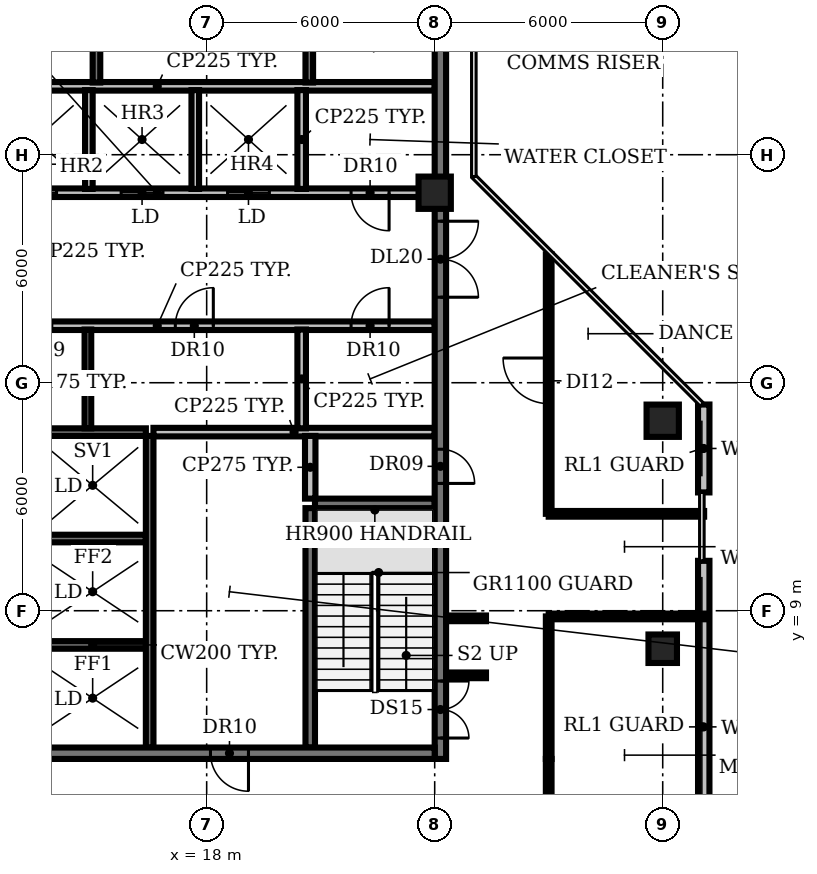
"""IFC4 building model, lengths in metres.
Left out: names, types, materials, properties, quantities, classifications, styles, units other than length and angle.
Written with IfcOpenShell. Run it as: python <this file> out.ifc"""

import sys

from ifc_helpers import new_model, si_unit, direction, frame, frame_2d, origin, origin_2d, place, context, subcontext, project, spatial, rectangle, circle, extrude, element, fill, save


model = new_model("IFC4")
c1 = context("Model", 3, precision=1e-05, world=origin(), true_north=direction((0.0, 1.0)))
c2 = subcontext(c1, "Body", "Model", "MODEL_VIEW")
j1 = project(units=[si_unit("LENGTHUNIT", "METRE"), si_unit("PLANEANGLEUNIT", "RADIAN")], contexts=[c1])
p1 = place(None, origin())
s1 = spatial("IfcSite", under=j1, at=p1, CompositionType="ELEMENT")
p2 = place(p1, origin())
s2 = spatial("IfcBuilding", under=s1, at=p2, CompositionType="ELEMENT")
p3 = place(p2, frame((0.0, 0.0, 272.6)))
s3 = spatial("IfcBuildingStorey", under=s2, at=p3, CompositionType="ELEMENT", Elevation=272.6)
p4 = place(p3, frame((24.0, 20.0, 0.0), z_axis=(0.0, 0.0, 1.0), x_axis=(1.0, 0.0, 0.0)))
e1 = element("IfcColumn", 1, at=p4, inside=s3, PredefinedType="COLUMN", context=c2, shape_type="SweptSolid", body=[
    extrude(circle(Radius=0.425, at=origin_2d()), origin(), (0.0, 0.0, 1.0), 3.85),
])
p5 = place(p3, frame((30.0, 8.0, 0.0), z_axis=(0.0, 0.0, 1.0), x_axis=(1.0, 0.0, 0.0)))
e2 = element("IfcColumn", 2, at=p5, inside=s3, PredefinedType="COLUMN", context=c2, shape_type="SweptSolid", body=[
    extrude(rectangle(XDim=0.75, YDim=0.75, at=origin_2d()), origin(), (0.0, 0.0, 1.0), 3.85),
])
p6 = place(p3, frame((30.0, 14.0, 0.0), z_axis=(0.0, 0.0, 1.0), x_axis=(1.0, 0.0, 0.0)))
e3 = element("IfcColumn", 3, at=p6, inside=s3, PredefinedType="COLUMN", context=c2, shape_type="SweptSolid", body=[
    extrude(circle(Radius=0.425, at=origin_2d()), origin(), (0.0, 0.0, 1.0), 3.85),
])
p7 = place(p3, frame((31.08, 1.573, 0.0), z_axis=(0.0, 0.0, 1.0), x_axis=(0.0, 1.0, 0.0)))
e4 = element("IfcWall", 4, at=p7, inside=s3, PredefinedType="SOLIDWALL", context=c2, shape_type="SweptSolid", body=[
    extrude(rectangle(XDim=8.74, YDim=0.3, at=frame_2d((4.37, 0.0))), origin(), (0.0, 0.0, 1.0), 3.85),
])
p8 = place(p3, frame((31.08, 12.113, 0.0), z_axis=(0.0, 0.0, 1.0), x_axis=(0.0, 1.0, 0.0)))
e5 = element("IfcWall", 5, at=p8, inside=s3, PredefinedType="SOLIDWALL", context=c2, shape_type="SweptSolid", body=[
    extrude(rectangle(XDim=2.313, YDim=0.3, at=frame_2d((1.157, 0.0))), origin(), (0.0, 0.0, 1.0), 3.85),
])
for number, where, z_axis, x_axis in (
    (6, (13.6, 8.1, 0.0), (0.0, 0.0, 1.0), (1.0, 0.0, 0.0)),
    (7, (13.6, 10.9, 0.0), (0.0, 0.0, 1.0), (1.0, 0.0, 0.0)),
):
    element("IfcWall", number, at=place(p3, frame(where, z_axis=z_axis, x_axis=x_axis)), inside=s3, PredefinedType="SHEAR", context=c2, shape_type="SweptSolid", body=[
        extrude(rectangle(XDim=2.8, YDim=0.2, at=frame_2d((1.4, 0.0))), origin(), (0.0, 0.0, 1.0), 3.85),
    ])
p9 = place(p3, frame((20.85, 11.825, 0.0), z_axis=(0.0, 0.0, 1.0), x_axis=(1.0, 0.0, 0.0)))
e8 = element("IfcWall", 8, at=p9, inside=s3, PredefinedType="SHEAR", context=c2, shape_type="SweptSolid", body=[
    extrude(rectangle(XDim=3.15, YDim=0.25, at=frame_2d((1.575, 0.0))), origin(), (0.0, 0.0, 1.0), 3.85),
])
p10 = place(p3, frame((13.6, 13.7, 0.0), z_axis=(0.0, 0.0, 1.0), x_axis=(1.0, 0.0, 0.0)))
e9 = element("IfcWall", 9, at=p10, inside=s3, PredefinedType="SHEAR", context=c2, shape_type="SweptSolid", body=[
    extrude(rectangle(XDim=2.8, YDim=0.2, at=frame_2d((1.4, 0.0))), origin(), (0.0, 0.0, 1.0), 3.85),
])
p11 = place(p3, frame((16.6, 13.7, 0.0), z_axis=(0.0, 0.0, 1.0), x_axis=(1.0, 0.0, 0.0)))
e10 = element("IfcWall", 10, at=p11, inside=s3, PredefinedType="PARTITIONING", context=c2, shape_type="SweptSolid", body=[
    extrude(rectangle(XDim=7.4, YDim=0.225, at=frame_2d((3.7, 0.0))), origin(), (0.0, 0.0, 1.0), 3.85),
])
p12 = place(p3, frame((9.4, 16.5, 0.0), z_axis=(0.0, 0.0, 1.0), x_axis=(1.0, 0.0, 0.0)))
e11 = element("IfcWall", 11, at=p12, inside=s3, PredefinedType="PARTITIONING", context=c2, shape_type="SweptSolid", body=[
    extrude(rectangle(XDim=14.6, YDim=0.225, at=frame_2d((7.3, 0.0))), origin(), (0.0, 0.0, 1.0), 3.85),
])
p13 = place(p12, frame((0.85, 0.0, 0.0)))
e12 = element("IfcOpeningElement", 12, at=p13, cuts=e11, PredefinedType="OPENING", context=c2, shape_type="SweptSolid", body=[
    extrude(rectangle(XDim=0.9, YDim=2.1, at=frame_2d((0.45, 1.05))), frame((0.0, 0.123, 0.0), z_axis=(0.0, -1.0, 0.0), x_axis=(1.0, 0.0, 0.0)), (0.0, 0.0, 1.0), 0.245),
])
p14 = place(p12, frame((3.625, 0.0, 0.0)))
e13 = element("IfcOpeningElement", 13, at=p14, cuts=e11, PredefinedType="OPENING", context=c2, shape_type="SweptSolid", body=[
    extrude(rectangle(XDim=0.9, YDim=2.1, at=frame_2d((0.45, 1.05))), frame((0.0, 0.123, 0.0), z_axis=(0.0, -1.0, 0.0), x_axis=(1.0, 0.0, 0.0)), (0.0, 0.0, 1.0), 0.245),
])
p15 = place(p12, frame((7.775, 0.0, 0.0)))
e14 = element("IfcOpeningElement", 14, at=p15, cuts=e11, PredefinedType="OPENING", context=c2, shape_type="SweptSolid", body=[
    extrude(rectangle(XDim=1.0, YDim=2.1, at=frame_2d((0.5, 1.05))), frame((0.0, 0.123, 0.0), z_axis=(0.0, -1.0, 0.0), x_axis=(1.0, 0.0, 0.0)), (0.0, 0.0, 1.0), 0.245),
])
p16 = place(p12, frame((12.4, 0.0, 0.0)))
e15 = element("IfcOpeningElement", 15, at=p16, cuts=e11, PredefinedType="OPENING", context=c2, shape_type="SweptSolid", body=[
    extrude(rectangle(XDim=1.0, YDim=2.1, at=frame_2d((0.5, 1.05))), frame((0.0, 0.123, 0.0), z_axis=(0.0, -1.0, 0.0), x_axis=(1.0, 0.0, 0.0)), (0.0, 0.0, 1.0), 0.245),
])
p17 = place(p3, frame((24.0, 20.0, 0.0), z_axis=(0.0, 0.0, 1.0), x_axis=(-1.0, 0.0, 0.0)))
e16 = element("IfcWall", 16, at=p17, inside=s3, PredefinedType="PARTITIONING", context=c2, shape_type="SweptSolid", body=[
    extrude(rectangle(XDim=14.6, YDim=0.225, at=frame_2d((7.3, 0.0))), origin(), (0.0, 0.0, 1.0), 3.85),
])
p18 = place(p17, frame((12.75, 0.0, 0.0)))
e17 = element("IfcOpeningElement", 17, at=p18, cuts=e16, PredefinedType="OPENING", context=c2, shape_type="SweptSolid", body=[
    extrude(rectangle(XDim=1.1, YDim=2.1, at=frame_2d((0.55, 1.05))), frame((0.0, 0.123, 0.0), z_axis=(0.0, -1.0, 0.0), x_axis=(1.0, 0.0, 0.0)), (0.0, 0.0, 1.0), 0.245),
])
p19 = place(p17, frame((9.95, 0.0, 0.0)))
e18 = element("IfcOpeningElement", 18, at=p19, cuts=e16, PredefinedType="OPENING", context=c2, shape_type="SweptSolid", body=[
    extrude(rectangle(XDim=1.1, YDim=2.1, at=frame_2d((0.55, 1.05))), frame((0.0, 0.123, 0.0), z_axis=(0.0, -1.0, 0.0), x_axis=(1.0, 0.0, 0.0)), (0.0, 0.0, 1.0), 0.245),
])
p20 = place(p17, frame((7.15, 0.0, 0.0)))
e19 = element("IfcOpeningElement", 19, at=p20, cuts=e16, PredefinedType="OPENING", context=c2, shape_type="SweptSolid", body=[
    extrude(rectangle(XDim=1.1, YDim=2.1, at=frame_2d((0.55, 1.05))), frame((0.0, 0.123, 0.0), z_axis=(0.0, -1.0, 0.0), x_axis=(1.0, 0.0, 0.0)), (0.0, 0.0, 1.0), 0.245),
])
p21 = place(p17, frame((4.35, 0.0, 0.0)))
e20 = element("IfcOpeningElement", 20, at=p21, cuts=e16, PredefinedType="OPENING", context=c2, shape_type="SweptSolid", body=[
    extrude(rectangle(XDim=1.1, YDim=2.1, at=frame_2d((0.55, 1.05))), frame((0.0, 0.123, 0.0), z_axis=(0.0, -1.0, 0.0), x_axis=(1.0, 0.0, 0.0)), (0.0, 0.0, 1.0), 0.245),
])
p22 = place(p17, frame((1.2, 0.0, 0.0)))
e21 = element("IfcOpeningElement", 21, at=p22, cuts=e16, PredefinedType="OPENING", context=c2, shape_type="SweptSolid", body=[
    extrude(rectangle(XDim=1.0, YDim=2.1, at=frame_2d((0.5, 1.05))), frame((0.0, 0.123, 0.0), z_axis=(0.0, -1.0, 0.0), x_axis=(1.0, 0.0, 0.0)), (0.0, 0.0, 1.0), 0.245),
])
p23 = place(p3, frame((9.4, 22.8, 0.0), z_axis=(0.0, 0.0, 1.0), x_axis=(1.0, 0.0, 0.0)))
e22 = element("IfcWall", 22, at=p23, inside=s3, PredefinedType="PARTITIONING", context=c2, shape_type="SweptSolid", body=[
    extrude(rectangle(XDim=14.6, YDim=0.225, at=frame_2d((7.3, 0.0))), origin(), (0.0, 0.0, 1.0), 3.85),
])
p24 = place(p3, frame((14.875, 13.8, 0.0), z_axis=(0.0, 0.0, 1.0), x_axis=(0.0, 1.0, 0.0)))
e23 = element("IfcWall", 23, at=p24, inside=s3, PredefinedType="PARTITIONING", context=c2, shape_type="SweptSolid", body=[
    extrude(rectangle(XDim=2.6, YDim=0.175, at=frame_2d((1.3, 0.0))), origin(), (0.0, 0.0, 1.0), 3.85),
])
p25 = place(p3, frame((14.9, 20.1, 0.0), z_axis=(0.0, 0.0, 1.0), x_axis=(0.0, 1.0, 0.0)))
e24 = element("IfcWall", 24, at=p25, inside=s3, PredefinedType="SOLIDWALL", context=c2, shape_type="SweptSolid", body=[
    extrude(rectangle(XDim=2.6, YDim=0.2, at=frame_2d((1.3, 0.0))), origin(), (0.0, 0.0, 1.0), 3.85),
])
p26 = place(p3, frame((15.1, 22.9, 0.0), z_axis=(0.0, 0.0, 1.0), x_axis=(0.0, 1.0, 0.0)))
e25 = element("IfcWall", 25, at=p26, inside=s3, PredefinedType="SHEAR", context=c2, shape_type="SweptSolid", body=[
    extrude(rectangle(XDim=1.9, YDim=0.2, at=frame_2d((0.95, 0.0))), origin(), (0.0, 0.0, 1.0), 3.85),
])
p27 = place(p3, frame((16.5, 5.4, 0.0), z_axis=(0.0, 0.0, 1.0), x_axis=(0.0, 1.0, 0.0)))
e26 = element("IfcWall", 26, at=p27, inside=s3, PredefinedType="SHEAR", context=c2, shape_type="SweptSolid", body=[
    extrude(rectangle(XDim=8.2, YDim=0.2, at=frame_2d((4.1, 0.0))), origin(), (0.0, 0.0, 1.0), 3.85),
])
p28 = place(p3, frame((17.7, 20.1, 0.0), z_axis=(0.0, 0.0, 1.0), x_axis=(0.0, 1.0, 0.0)))
e27 = element("IfcWall", 27, at=p28, inside=s3, PredefinedType="SOLIDWALL", context=c2, shape_type="SweptSolid", body=[
    extrude(rectangle(XDim=2.6, YDim=0.2, at=frame_2d((1.3, 0.0))), origin(), (0.0, 0.0, 1.0), 3.85),
])
for number, where, z_axis, x_axis in (
    (28, (20.5, 13.8, 0.0), (0.0, 0.0, 1.0), (0.0, 1.0, 0.0)),
    (29, (20.5, 20.1, 0.0), (0.0, 0.0, 1.0), (0.0, 1.0, 0.0)),
):
    element("IfcWall", number, at=place(p3, frame(where, z_axis=z_axis, x_axis=x_axis)), inside=s3, PredefinedType="PARTITIONING", context=c2, shape_type="SweptSolid", body=[
        extrude(rectangle(XDim=2.6, YDim=0.225, at=frame_2d((1.3, 0.0))), origin(), (0.0, 0.0, 1.0), 3.85),
    ])
p29 = place(p3, frame((20.7, 22.9, 0.0), z_axis=(0.0, 0.0, 1.0), x_axis=(0.0, 1.0, 0.0)))
e30 = element("IfcWall", 30, at=p29, inside=s3, PredefinedType="SHEAR", context=c2, shape_type="SweptSolid", body=[
    extrude(rectangle(XDim=1.9, YDim=0.2, at=frame_2d((0.95, 0.0))), origin(), (0.0, 0.0, 1.0), 3.85),
])
p30 = place(p3, frame((20.725, 5.4, 0.0), z_axis=(0.0, 0.0, 1.0), x_axis=(0.0, 1.0, 0.0)))
e31 = element("IfcWall", 31, at=p30, inside=s3, PredefinedType="SHEAR", context=c2, shape_type="SweptSolid", body=[
    extrude(rectangle(XDim=6.3, YDim=0.25, at=frame_2d((3.15, 0.0))), origin(), (0.0, 0.0, 1.0), 3.85),
])
p31 = place(p3, frame((20.725, 11.95, 0.0), z_axis=(0.0, 0.0, 1.0), x_axis=(0.0, 1.0, 0.0)))
e32 = element("IfcWall", 32, at=p31, inside=s3, PredefinedType="PARTITIONING", context=c2, shape_type="SweptSolid", body=[
    extrude(rectangle(XDim=1.65, YDim=0.275, at=frame_2d((0.825, 0.0))), origin(), (0.0, 0.0, 1.0), 3.85),
])
p32 = place(p3, frame((24.15, 25.655, 0.0), z_axis=(0.0, 0.0, 1.0), x_axis=(0.0, -1.0, 0.0)))
e33 = element("IfcWall", 33, at=p32, inside=s3, PredefinedType="SHEAR", context=c2, shape_type="SweptSolid", body=[
    extrude(rectangle(XDim=20.555, YDim=0.3, at=frame_2d((10.277, 0.0))), origin(), (0.0, 0.0, 1.0), 3.85),
])
p33 = place(p32, frame((18.505, 0.0, 0.0)))
e34 = element("IfcOpeningElement", 34, at=p33, cuts=e33, PredefinedType="OPENING", context=c2, shape_type="SweptSolid", body=[
    extrude(rectangle(XDim=1.5, YDim=2.1, at=frame_2d((0.75, 1.05))), frame((0.0, 0.16, 0.0), z_axis=(0.0, -1.0, 0.0), x_axis=(1.0, 0.0, 0.0)), (0.0, 0.0, 1.0), 0.32),
])
p34 = place(p32, frame((12.405, 0.0, 0.0)))
e35 = element("IfcOpeningElement", 35, at=p34, cuts=e33, PredefinedType="OPENING", context=c2, shape_type="SweptSolid", body=[
    extrude(rectangle(XDim=0.9, YDim=2.1, at=frame_2d((0.45, 1.05))), frame((0.0, 0.16, 0.0), z_axis=(0.0, -1.0, 0.0), x_axis=(1.0, 0.0, 0.0)), (0.0, 0.0, 1.0), 0.32),
])
p35 = place(p32, frame((6.405, 0.0, 0.0)))
e36 = element("IfcOpeningElement", 36, at=p35, cuts=e33, PredefinedType="OPENING", context=c2, shape_type="SweptSolid", body=[
    extrude(rectangle(XDim=2.0, YDim=2.1, at=frame_2d((1.0, 1.05))), frame((0.0, 0.16, 0.0), z_axis=(0.0, -1.0, 0.0), x_axis=(1.0, 0.0, 0.0)), (0.0, 0.0, 1.0), 0.32),
])
p36 = place(p3, frame((24.0, 5.25, 0.0), z_axis=(0.0, 0.0, 1.0), x_axis=(-1.0, 0.0, 0.0)))
e37 = element("IfcWall", 37, at=p36, inside=s3, PredefinedType="SHEAR", context=c2, shape_type="SweptSolid", body=[
    extrude(rectangle(XDim=18.0, YDim=0.3, at=frame_2d((9.0, 0.0))), origin(), (0.0, 0.0, 1.0), 3.85),
])
p37 = place(p36, frame((13.0, 0.0, 0.0)))
e38 = element("IfcOpeningElement", 38, at=p37, cuts=e37, PredefinedType="OPENING", context=c2, shape_type="SweptSolid", body=[
    extrude(rectangle(XDim=1.2, YDim=2.1, at=frame_2d((0.6, 1.05))), frame((0.0, 0.16, 0.0), z_axis=(0.0, -1.0, 0.0), x_axis=(1.0, 0.0, 0.0)), (0.0, 0.0, 1.0), 0.32),
])
p38 = place(p36, frame((4.9, 0.0, 0.0)))
e39 = element("IfcOpeningElement", 39, at=p38, cuts=e37, PredefinedType="OPENING", context=c2, shape_type="SweptSolid", body=[
    extrude(rectangle(XDim=1.0, YDim=2.1, at=frame_2d((0.5, 1.05))), frame((0.0, 0.16, 0.0), z_axis=(0.0, -1.0, 0.0), x_axis=(1.0, 0.0, 0.0)), (0.0, 0.0, 1.0), 0.32),
])
for number, where, z_axis, x_axis in (
    (40, (24.3, 7.3, 0.0), (0.0, 0.0, 1.0), (1.0, 0.0, 0.0)),
    (41, (24.3, 8.8, 0.0), (0.0, 0.0, 1.0), (1.0, 0.0, 0.0)),
):
    element("IfcWall", number, at=place(p3, frame(where, z_axis=z_axis, x_axis=x_axis)), inside=s3, PredefinedType="PARTITIONING", context=c2, shape_type="SweptSolid", body=[
        extrude(rectangle(XDim=1.05, YDim=0.15, at=frame_2d((0.525, 0.0))), origin(), (0.0, 0.0, 1.0), 2.9),
    ])
p39 = place(p3, frame((27.0, 1.2, 0.0), z_axis=(0.0, 0.0, 1.0), x_axis=(0.0, 1.0, 0.0)))
e42 = element("IfcWall", 42, at=p39, inside=s3, PredefinedType="PARTITIONING", context=c2, shape_type="SweptSolid", body=[
    extrude(rectangle(XDim=3.9, YDim=0.15, at=frame_2d((1.95, 0.0))), origin(), (0.0, 0.0, 1.0), 2.9),
])
p40 = place(p39, frame((1.4, 0.0, 0.0)))
e43 = element("IfcOpeningElement", 43, at=p40, cuts=e42, PredefinedType="OPENING", context=c2, shape_type="SweptSolid", body=[
    extrude(rectangle(XDim=1.2, YDim=2.1, at=frame_2d((0.6, 1.05))), frame((0.0, 0.085, 0.0), z_axis=(0.0, -1.0, 0.0), x_axis=(1.0, 0.0, 0.0)), (0.0, 0.0, 1.0), 0.17),
])
p41 = place(p3, frame((27.0, 5.1, 0.0), z_axis=(0.0, 0.0, 1.0), x_axis=(0.0, 1.0, 0.0)))
e44 = element("IfcWall", 44, at=p41, inside=s3, PredefinedType="PARTITIONING", context=c2, shape_type="SweptSolid", body=[
    extrude(rectangle(XDim=3.75, YDim=0.15, at=frame_2d((1.875, 0.0))), origin(), (0.0, 0.0, 1.0), 2.9),
])
p42 = place(p3, frame((27.0, 8.85, 0.0), z_axis=(0.0, 0.0, 1.0), x_axis=(1.0, 0.0, 0.0)))
e45 = element("IfcWall", 45, at=p42, inside=s3, PredefinedType="PARTITIONING", context=c2, shape_type="SweptSolid", body=[
    extrude(rectangle(XDim=4.09, YDim=0.15, at=frame_2d((2.045, 0.0))), origin(), (0.0, 0.0, 1.0), 2.9),
])
p43 = place(p3, frame((27.0, 11.55, 0.0), z_axis=(0.0, 0.0, 1.0), x_axis=(0.0, 1.0, 0.0)))
e46 = element("IfcWall", 46, at=p43, inside=s3, PredefinedType="PARTITIONING", context=c2, shape_type="SweptSolid", body=[
    extrude(rectangle(XDim=6.83, YDim=0.15, at=frame_2d((3.415, 0.0))), origin(), (0.0, 0.0, 1.0), 2.9),
])
p44 = place(p43, frame((2.9, 0.0, 0.0)))
e47 = element("IfcOpeningElement", 47, at=p44, cuts=e46, PredefinedType="OPENING", context=c2, shape_type="SweptSolid", body=[
    extrude(rectangle(XDim=1.2, YDim=2.1, at=frame_2d((0.6, 1.05))), frame((0.0, 0.085, 0.0), z_axis=(0.0, -1.0, 0.0), x_axis=(1.0, 0.0, 0.0)), (0.0, 0.0, 1.0), 0.17),
])
p45 = place(p3, frame((27.0, 11.55, 0.0), z_axis=(0.0, 0.0, 1.0), x_axis=(1.0, 0.0, 0.0)))
e48 = element("IfcWall", 48, at=p45, inside=s3, PredefinedType="PARTITIONING", context=c2, shape_type="SweptSolid", body=[
    extrude(rectangle(XDim=4.09, YDim=0.15, at=frame_2d((2.045, 0.0))), origin(), (0.0, 0.0, 1.0), 2.9),
])
p46 = place(p15, origin())
e49 = element("IfcDoor", 49, at=p46, inside=s3, OperationType="SINGLE_SWING_RIGHT", PredefinedType="DOOR", context=c2, shape_type="SweptSolid", body=[
    extrude(rectangle(XDim=1.0, YDim=2.1, at=frame_2d((0.5, 1.05))), frame((0.0, 0.025, 0.0), z_axis=(0.0, -1.0, 0.0), x_axis=(1.0, 0.0, 0.0)), (0.0, 0.0, 1.0), 0.05),
])
fill(e14, e49)
p47 = place(p16, origin())
e50 = element("IfcDoor", 50, at=p47, inside=s3, OperationType="SINGLE_SWING_RIGHT", PredefinedType="DOOR", context=c2, shape_type="SweptSolid", body=[
    extrude(rectangle(XDim=1.0, YDim=2.1, at=frame_2d((0.5, 1.05))), frame((0.0, 0.025, 0.0), z_axis=(0.0, -1.0, 0.0), x_axis=(1.0, 0.0, 0.0)), (0.0, 0.0, 1.0), 0.05),
])
fill(e15, e50)
p48 = place(p19, origin())
e51 = element("IfcDoor", 51, at=p48, inside=s3, OperationType="DOUBLE_DOOR_SLIDING", PredefinedType="DOOR", context=c2, shape_type="SweptSolid", body=[
    extrude(rectangle(XDim=1.1, YDim=2.1, at=frame_2d((0.55, 1.05))), frame((0.0, 0.025, 0.0), z_axis=(0.0, -1.0, 0.0), x_axis=(1.0, 0.0, 0.0)), (0.0, 0.0, 1.0), 0.05),
])
fill(e18, e51)
p49 = place(p20, origin())
e52 = element("IfcDoor", 52, at=p49, inside=s3, OperationType="DOUBLE_DOOR_SLIDING", PredefinedType="DOOR", context=c2, shape_type="SweptSolid", body=[
    extrude(rectangle(XDim=1.1, YDim=2.1, at=frame_2d((0.55, 1.05))), frame((0.0, 0.025, 0.0), z_axis=(0.0, -1.0, 0.0), x_axis=(1.0, 0.0, 0.0)), (0.0, 0.0, 1.0), 0.05),
])
fill(e19, e52)
p50 = place(p21, origin())
e53 = element("IfcDoor", 53, at=p50, inside=s3, OperationType="DOUBLE_DOOR_SLIDING", PredefinedType="DOOR", context=c2, shape_type="SweptSolid", body=[
    extrude(rectangle(XDim=1.1, YDim=2.1, at=frame_2d((0.55, 1.05))), frame((0.0, 0.025, 0.0), z_axis=(0.0, -1.0, 0.0), x_axis=(1.0, 0.0, 0.0)), (0.0, 0.0, 1.0), 0.05),
])
fill(e20, e53)
p51 = place(p22, origin())
e54 = element("IfcDoor", 54, at=p51, inside=s3, OperationType="SINGLE_SWING_LEFT", PredefinedType="DOOR", context=c2, shape_type="SweptSolid", body=[
    extrude(rectangle(XDim=1.0, YDim=2.1, at=frame_2d((0.5, 1.05))), frame((0.0, 0.025, 0.0), z_axis=(0.0, -1.0, 0.0), x_axis=(1.0, 0.0, 0.0)), (0.0, 0.0, 1.0), 0.05),
])
fill(e21, e54)
p52 = place(p33, origin())
e55 = element("IfcDoor", 55, at=p52, inside=s3, OperationType="DOUBLE_DOOR_SINGLE_SWING", PredefinedType="DOOR", context=c2, shape_type="SweptSolid", body=[
    extrude(rectangle(XDim=1.5, YDim=2.1, at=frame_2d((0.75, 1.05))), frame((0.0, 0.025, 0.0), z_axis=(0.0, -1.0, 0.0), x_axis=(1.0, 0.0, 0.0)), (0.0, 0.0, 1.0), 0.05),
])
fill(e34, e55)
p53 = place(p34, origin())
e56 = element("IfcDoor", 56, at=p53, inside=s3, OperationType="SINGLE_SWING_RIGHT", PredefinedType="DOOR", context=c2, shape_type="SweptSolid", body=[
    extrude(rectangle(XDim=0.9, YDim=2.1, at=frame_2d((0.45, 1.05))), frame((0.0, 0.025, 0.0), z_axis=(0.0, -1.0, 0.0), x_axis=(1.0, 0.0, 0.0)), (0.0, 0.0, 1.0), 0.05),
])
fill(e35, e56)
p54 = place(p35, origin())
e57 = element("IfcDoor", 57, at=p54, inside=s3, OperationType="DOUBLE_DOOR_SINGLE_SWING", PredefinedType="DOOR", context=c2, shape_type="SweptSolid", body=[
    extrude(rectangle(XDim=2.0, YDim=2.1, at=frame_2d((1.0, 1.05))), frame((0.0, 0.025, 0.0), z_axis=(0.0, -1.0, 0.0), x_axis=(1.0, 0.0, 0.0)), (0.0, 0.0, 1.0), 0.05),
])
fill(e36, e57)
p55 = place(p38, origin())
e58 = element("IfcDoor", 58, at=p55, inside=s3, OperationType="SINGLE_SWING_LEFT", PredefinedType="DOOR", context=c2, shape_type="SweptSolid", body=[
    extrude(rectangle(XDim=1.0, YDim=2.1, at=frame_2d((0.5, 1.05))), frame((0.0, 0.025, 0.0), z_axis=(0.0, -1.0, 0.0), x_axis=(1.0, 0.0, 0.0)), (0.0, 0.0, 1.0), 0.05),
])
fill(e39, e58)
p56 = place(p44, origin())
e59 = element("IfcDoor", 59, at=p56, inside=s3, OperationType="SINGLE_SWING_RIGHT", PredefinedType="DOOR", context=c2, shape_type="SweptSolid", body=[
    extrude(rectangle(XDim=1.2, YDim=2.1, at=frame_2d((0.6, 1.05))), frame((0.0, 0.025, 0.0), z_axis=(0.0, -1.0, 0.0), x_axis=(1.0, 0.0, 0.0)), (0.0, 0.0, 1.0), 0.05),
])
fill(e47, e59)
save(model, sys.argv[1])
